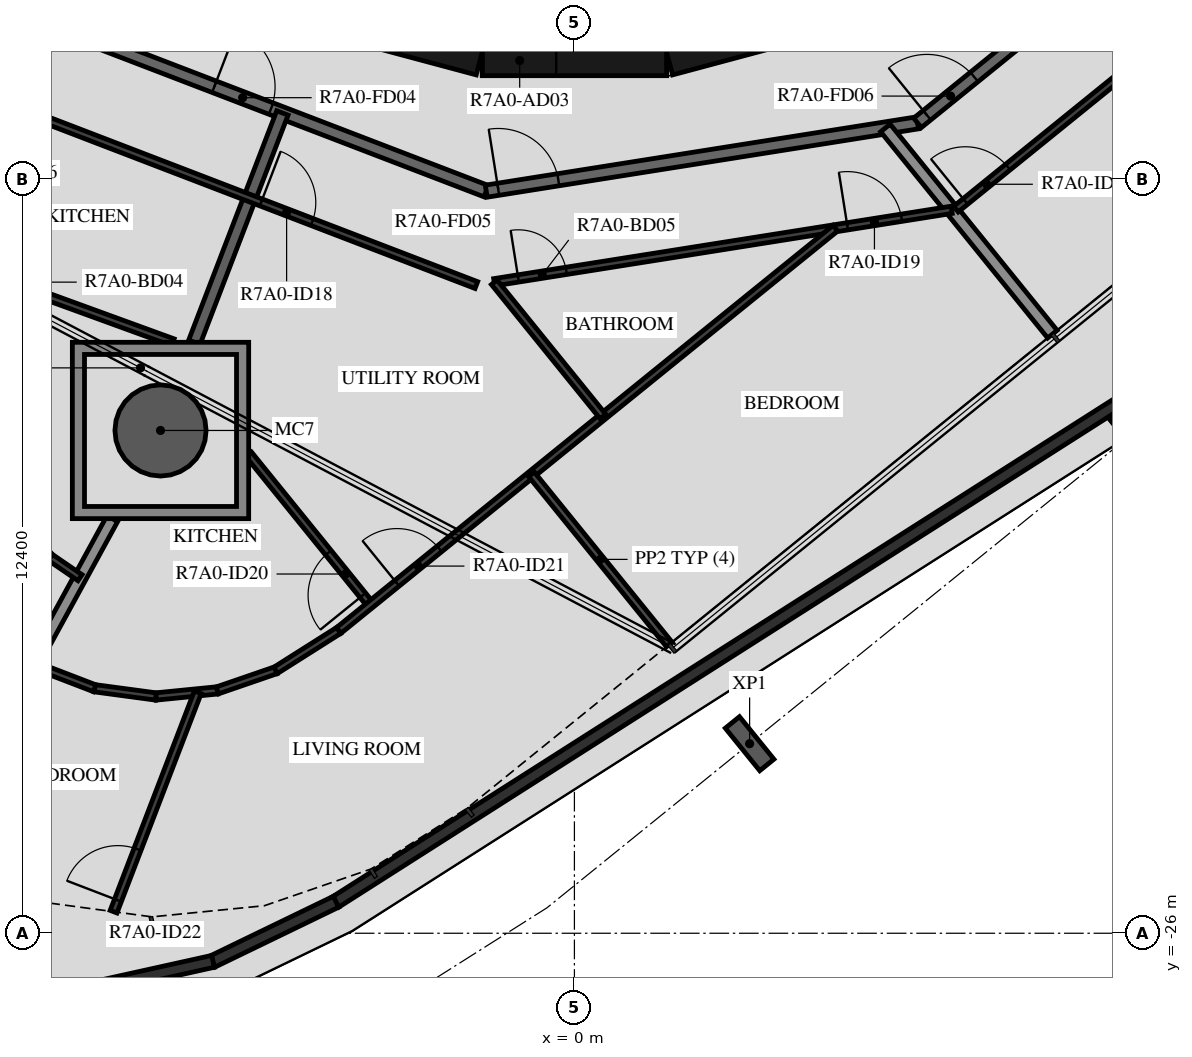
"""IFC4 building model, lengths in metres.
Left out: names, types, materials, properties, quantities, classifications, styles, units other than length and angle.
Written with IfcOpenShell. Run it as: python <this file> out.ifc"""

import sys

from ifc_helpers import new_model, si_unit, direction, frame, frame_2d, origin, origin_2d, place, context, subcontext, project, spatial, polyline, rectangle, hollow_circle, i_section, outline, extrude, element, fill, save


model = new_model("IFC4")
c1 = context("Model", 3, precision=1e-05, world=origin(), true_north=direction((0.0, 1.0)))
c2 = subcontext(c1, "Body", "Model", "MODEL_VIEW")
j1 = project(units=[si_unit("LENGTHUNIT", "METRE"), si_unit("PLANEANGLEUNIT", "RADIAN")], contexts=[c1])
p1 = place(None, origin())
s1 = spatial("IfcSite", under=j1, at=p1, CompositionType="ELEMENT")
p2 = place(p1, origin())
s2 = spatial("IfcBuilding", under=s1, at=p2, CompositionType="ELEMENT")
p3 = place(p2, frame((0.0, 0.0, 263.4)))
s3 = spatial("IfcBuildingStorey", under=s2, at=p3, CompositionType="ELEMENT", Elevation=263.4)
p4 = place(p3, frame((-6.807, -17.732, -0.45), z_axis=(0.0, 0.0, 1.0), x_axis=(1.0, 0.0, 0.0)))
e1 = element("IfcColumn", 1, at=p4, inside=s3, PredefinedType="COLUMN", context=c2, shape_type="SweptSolid", body=[
    extrude(hollow_circle(Radius=0.75, WallThickness=0.035, at=origin_2d()), origin(), (0.0, 0.0, 1.0), 3.57),
])
for number, where, z_axis, x_axis in (
    (2, (2.881, -22.883, -0.45), (0.0, 0.0, 1.0), (-0.777, -0.629, 0.0)),
    (3, (9.182, -17.781, -0.45), (0.0, 0.0, 1.0), (-0.777, -0.629, 0.0)),
):
    element("IfcColumn", number, at=place(p3, frame(where, z_axis=z_axis, x_axis=x_axis)), inside=s3, PredefinedType="COLUMN", context=c2, shape_type="SweptSolid", body=[
        extrude(i_section(OverallWidth=0.3, OverallDepth=0.9, WebThickness=0.019, FlangeThickness=0.035, FilletRadius=0.03, at=origin_2d()), origin(), (0.0, 0.0, 1.0), 3.57),
    ])
p5 = place(p3, frame((24.757, -7.212, 0.03), z_axis=(0.0, 0.0, 1.0), x_axis=(-0.843392095095, -0.537298589177, 0.0)))
e4 = element("IfcWall", 4, at=p5, inside=s3, PredefinedType="PARAPET", context=c2, shape_type="SweptSolid", body=[
    extrude(rectangle(XDim=34.009, YDim=0.2, at=frame_2d((17.004, 0.0))), origin(), (0.0, 0.0, 1.0), 1.5),
])
p6 = place(p3, frame((-3.921, -25.482, 0.03), z_axis=(0.0, 0.0, 1.0), x_axis=(-0.900085379351, -0.435713564028, 0.0)))
e5 = element("IfcWall", 5, at=p6, inside=s3, PredefinedType="PARAPET", context=c2, shape_type="SweptSolid", body=[
    extrude(rectangle(XDim=2.258, YDim=0.2, at=frame_2d((1.129, 0.0))), origin(), (0.0, 0.0, 1.0), 1.5),
])
p7 = place(p3, frame((-5.942, -26.462, 0.03), z_axis=(0.0, 0.0, 1.0), x_axis=(-0.976302939935, -0.21640833966, 0.0)))
e6 = element("IfcWall", 6, at=p7, inside=s3, PredefinedType="PARAPET", context=c2, shape_type="SweptSolid", body=[
    extrude(rectangle(XDim=2.228, YDim=0.2, at=frame_2d((1.114, 0.0))), origin(), (0.0, 0.0, 1.0), 1.5),
])
for number, where, z_axis, x_axis in (
    (7, (1.55, -11.643, 0.0), (0.0, 0.0, 1.0), (0.966, 0.259, 0.0)),
    (8, (-4.479, -10.858, 0.0), (0.0, 0.0, 1.0), (0.966, -0.259, 0.0)),
):
    element("IfcWall", number, at=place(p3, frame(where, z_axis=z_axis, x_axis=x_axis)), inside=s3, PredefinedType="SHEAR", context=c2, shape_type="SweptSolid", body=[
        extrude(rectangle(XDim=3.033, YDim=0.5, at=frame_2d((1.516, 0.0))), origin(), (0.0, 0.0, 1.0), 3.12),
    ])
p8 = place(p3, frame((-1.516, -11.647, 0.0), z_axis=(0.0, 0.0, 1.0), x_axis=(1.0, 0.0, 0.0)))
e9 = element("IfcWall", 9, at=p8, inside=s3, PredefinedType="SHEAR", context=c2, shape_type="SweptSolid", body=[
    extrude(rectangle(XDim=3.033, YDim=0.5, at=frame_2d((1.516, 0.0))), origin(), (0.0, 0.0, 1.0), 3.12),
])
p9 = place(p8, frame((0.016, 0.0, 0.0)))
e10 = element("IfcOpeningElement", 10, at=p9, cuts=e9, PredefinedType="OPENING", context=c2, shape_type="SweptSolid", body=[
    extrude(rectangle(XDim=1.2, YDim=2.1, at=frame_2d((0.6, 1.05))), frame((0.0, 0.26, 0.0), z_axis=(0.0, -1.0, 0.0), x_axis=(1.0, 0.0, 0.0)), (0.0, 0.0, 1.0), 0.52),
])
p10 = place(p3, frame((-8.154, -11.223, 0.0), z_axis=(0.0, 0.0, 1.0), x_axis=(0.93359073609, -0.358341090983, 0.0)))
e11 = element("IfcWall", 11, at=p10, inside=s3, PredefinedType="STANDARD", context=c2, shape_type="SweptSolid", body=[
    extrude(rectangle(XDim=7.181, YDim=0.2, at=frame_2d((3.59, 0.0))), origin(), (0.0, 0.0, 1.0), 3.12),
])
p11 = place(p10, frame((2.39, 0.0, 0.0)))
e12 = element("IfcOpeningElement", 12, at=p11, cuts=e11, PredefinedType="OPENING", context=c2, shape_type="SweptSolid", body=[
    extrude(rectangle(XDim=1.0, YDim=2.1, at=frame_2d((0.5, 1.05))), frame((0.0, 0.11, 0.0), z_axis=(0.0, -1.0, 0.0), x_axis=(1.0, 0.0, 0.0)), (0.0, 0.0, 1.0), 0.22),
])
p12 = place(p3, frame((-1.45, -13.797, 0.0), z_axis=(0.0, 0.0, 1.0), x_axis=(0.987690361611, 0.156421704315, 0.0)))
e13 = element("IfcWall", 13, at=p12, inside=s3, PredefinedType="STANDARD", context=c2, shape_type="SweptSolid", body=[
    extrude(rectangle(XDim=7.181, YDim=0.2, at=frame_2d((3.591, 0.0))), origin(), (0.0, 0.0, 1.0), 3.12),
])
p13 = place(p12, frame((0.2, 0.0, 0.0)))
e14 = element("IfcOpeningElement", 14, at=p13, cuts=e13, PredefinedType="OPENING", context=c2, shape_type="SweptSolid", body=[
    extrude(rectangle(XDim=1.0, YDim=2.1, at=frame_2d((0.5, 1.05))), frame((0.0, 0.11, 0.0), z_axis=(0.0, -1.0, 0.0), x_axis=(1.0, 0.0, 0.0)), (0.0, 0.0, 1.0), 0.22),
])
p14 = place(p3, frame((5.643, -12.673, 0.0), z_axis=(0.0, 0.0, 1.0), x_axis=(0.777160148113, 0.629302871585, 0.0)))
e15 = element("IfcWall", 15, at=p14, inside=s3, PredefinedType="STANDARD", context=c2, shape_type="SweptSolid", body=[
    extrude(rectangle(XDim=7.181, YDim=0.2, at=frame_2d((3.59, 0.0))), origin(), (0.0, 0.0, 1.0), 3.12),
])
p15 = place(p14, frame((0.2, 0.0, 0.0)))
e16 = element("IfcOpeningElement", 16, at=p15, cuts=e15, PredefinedType="OPENING", context=c2, shape_type="SweptSolid", body=[
    extrude(rectangle(XDim=1.0, YDim=2.1, at=frame_2d((0.5, 1.05))), frame((0.0, 0.11, 0.0), z_axis=(0.0, -1.0, 0.0), x_axis=(1.0, 0.0, 0.0)), (0.0, 0.0, 1.0), 0.22),
])
p16 = place(p3, frame((-6.25, -16.282, 0.0), z_axis=(0.0, 0.0, 1.0), x_axis=(0.358351333512, 0.933586804625, 0.0)))
e17 = element("IfcWall", 17, at=p16, inside=s3, PredefinedType="STANDARD", context=c2, shape_type="SweptSolid", body=[
    extrude(rectangle(XDim=4.04, YDim=0.2, at=frame_2d((2.02, 0.0))), origin(), (0.0, 0.0, 1.0), 3.12),
])
p17 = place(p3, frame((-10.637, -24.738, 0.0), z_axis=(0.0, 0.0, 1.0), x_axis=(0.479683887596, 0.877441375808, 0.0)))
e18 = element("IfcWall", 18, at=p17, inside=s3, PredefinedType="STANDARD", context=c2, shape_type="SweptSolid", body=[
    extrude(rectangle(XDim=6.333, YDim=0.2, at=frame_2d((3.166, 0.0))), origin(), (0.0, 0.0, 1.0), 2.73),
])
p18 = place(p3, frame((7.861, -16.148, 0.0), z_axis=(0.0, 0.0, 1.0), x_axis=(-0.629330189513, 0.777138026716, 0.0)))
e19 = element("IfcWall", 19, at=p18, inside=s3, PredefinedType="STANDARD", context=c2, shape_type="SweptSolid", body=[
    extrude(rectangle(XDim=4.364, YDim=0.2, at=frame_2d((2.182, 0.0))), origin(), (0.0, 0.0, 1.0), 2.73),
])
p19 = place(p3, frame((-9.067, -12.479, 0.0), z_axis=(0.0, 0.0, 1.0), x_axis=(0.933579449035, -0.358370495911, 0.0)))
e20 = element("IfcWall", 20, at=p19, inside=s3, PredefinedType="PARTITIONING", context=c2, shape_type="SweptSolid", body=[
    extrude(rectangle(XDim=7.985, YDim=0.12, at=frame_2d((3.992, 0.0))), origin(), (0.0, 0.0, 1.0), 3.12),
])
p20 = place(p19, frame((4.192, 0.0, 0.0)))
e21 = element("IfcOpeningElement", 21, at=p20, cuts=e20, PredefinedType="OPENING", context=c2, shape_type="SweptSolid", body=[
    extrude(rectangle(XDim=0.9, YDim=2.1, at=frame_2d((0.45, 1.05))), frame((0.0, 0.07, 0.0), z_axis=(0.0, -1.0, 0.0), x_axis=(1.0, 0.0, 0.0)), (0.0, 0.0, 1.0), 0.14),
])
p21 = place(p3, frame((-10.071, -15.019, 0.0), z_axis=(0.0, 0.0, 1.0), x_axis=(0.939648507355, -0.34214131967, 0.0)))
e22 = element("IfcWall", 22, at=p21, inside=s3, PredefinedType="PARTITIONING", context=c2, shape_type="SweptSolid", body=[
    extrude(rectangle(XDim=3.691, YDim=0.12, at=frame_2d((1.846, 0.0))), origin(), (0.0, 0.0, 1.0), 3.12),
])
p22 = place(p21, frame((0.4, 0.0, 0.0)))
e23 = element("IfcOpeningElement", 23, at=p22, cuts=e22, PredefinedType="OPENING", context=c2, shape_type="SweptSolid", body=[
    extrude(rectangle(XDim=0.8, YDim=2.1, at=frame_2d((0.4, 1.05))), frame((0.0, 0.07, 0.0), z_axis=(0.0, -1.0, 0.0), x_axis=(1.0, 0.0, 0.0)), (0.0, 0.0, 1.0), 0.14),
])
p23 = place(p3, frame((-8.13, -20.153, 0.0), z_axis=(0.0, 0.0, 1.0), x_axis=(-0.825599905246, 0.564255967145, 0.0)))
e24 = element("IfcWall", 24, at=p23, inside=s3, PredefinedType="PARTITIONING", context=c2, shape_type="SweptSolid", body=[
    extrude(rectangle(XDim=0.593, YDim=0.12, at=frame_2d((0.297, 0.0))), origin(), (0.0, 0.0, 1.0), 3.12),
])
p24 = place(p3, frame((-8.62, -19.818, 0.0), z_axis=(0.0, 0.0, 1.0), x_axis=(-0.673448438961, 0.739234198385, 0.0)))
e25 = element("IfcWall", 25, at=p24, inside=s3, PredefinedType="PARTITIONING", context=c2, shape_type="SweptSolid", body=[
    extrude(rectangle(XDim=0.642, YDim=0.12, at=frame_2d((0.321, 0.0))), origin(), (0.0, 0.0, 1.0), 3.12),
])
p25 = place(p3, frame((-1.318, -15.294, 0.0), z_axis=(0.0, 0.0, 1.0), x_axis=(0.987689040792, 0.156430044108, 0.0)))
e26 = element("IfcWall", 26, at=p25, inside=s3, PredefinedType="PARTITIONING", context=c2, shape_type="SweptSolid", body=[
    extrude(rectangle(XDim=7.616, YDim=0.12, at=frame_2d((3.808, 0.0))), origin(), (0.0, 0.0, 1.0), 3.12),
])
p26 = place(p25, frame((0.4, 0.0, 0.0)))
e27 = element("IfcOpeningElement", 27, at=p26, cuts=e26, PredefinedType="OPENING", context=c2, shape_type="SweptSolid", body=[
    extrude(rectangle(XDim=0.8, YDim=2.1, at=frame_2d((0.4, 1.05))), frame((0.0, 0.07, 0.0), z_axis=(0.0, -1.0, 0.0), x_axis=(1.0, 0.0, 0.0)), (0.0, 0.0, 1.0), 0.14),
])
p27 = place(p25, frame((5.88, 0.0, 0.0)))
e28 = element("IfcOpeningElement", 28, at=p27, cuts=e26, PredefinedType="OPENING", context=c2, shape_type="SweptSolid", body=[
    extrude(rectangle(XDim=0.9, YDim=2.1, at=frame_2d((0.45, 1.05))), frame((0.0, 0.07, 0.0), z_axis=(0.0, -1.0, 0.0), x_axis=(1.0, 0.0, 0.0)), (0.0, 0.0, 1.0), 0.14),
])
p28 = place(p3, frame((-5.872, -22.006, 0.0), z_axis=(0.0, 0.0, 1.0), x_axis=(-0.99510832942, -0.09878973995, 0.0)))
e29 = element("IfcWall", 29, at=p28, inside=s3, PredefinedType="PARTITIONING", context=c2, shape_type="SweptSolid", body=[
    extrude(rectangle(XDim=1.016, YDim=0.12, at=frame_2d((0.508, 0.0))), origin(), (0.0, 0.0, 1.0), 3.12),
])
p29 = place(p3, frame((-6.883, -22.106, 0.0), z_axis=(0.0, 0.0, 1.0), x_axis=(-0.991069822827, 0.133343939799, 0.0)))
e30 = element("IfcWall", 30, at=p29, inside=s3, PredefinedType="PARTITIONING", context=c2, shape_type="SweptSolid", body=[
    extrude(rectangle(XDim=1.016, YDim=0.12, at=frame_2d((0.508, 0.0))), origin(), (0.0, 0.0, 1.0), 3.12),
])
p30 = place(p3, frame((-7.89, -21.971, 0.0), z_axis=(0.0, 0.0, 1.0), x_axis=(-0.933574629243, 0.358383051545, 0.0)))
e31 = element("IfcWall", 31, at=p30, inside=s3, PredefinedType="PARTITIONING", context=c2, shape_type="SweptSolid", body=[
    extrude(rectangle(XDim=1.016, YDim=0.12, at=frame_2d((0.508, 0.0))), origin(), (0.0, 0.0, 1.0), 3.12),
])
p31 = place(p3, frame((-7.579, -25.646, 0.0), z_axis=(0.0, 0.0, 1.0), x_axis=(0.358314257596, 0.933601035134, 0.0)))
e32 = element("IfcWall", 32, at=p31, inside=s3, PredefinedType="PARTITIONING", context=c2, shape_type="SweptSolid", body=[
    extrude(rectangle(XDim=3.864, YDim=0.12, at=frame_2d((1.932, 0.0))), origin(), (0.0, 0.0, 1.0), 3.12),
])
p32 = place(p31, frame((0.2, 0.0, 0.0)))
e33 = element("IfcOpeningElement", 33, at=p32, cuts=e32, PredefinedType="OPENING", context=c2, shape_type="SweptSolid", body=[
    extrude(rectangle(XDim=0.9, YDim=2.1, at=frame_2d((0.45, 1.05))), frame((0.0, 0.07, 0.0), z_axis=(0.0, -1.0, 0.0), x_axis=(1.0, 0.0, 0.0)), (0.0, 0.0, 1.0), 0.14),
])
p33 = place(p3, frame((-3.354, -20.597, 0.0), z_axis=(0.0, 0.0, 1.0), x_axis=(-0.629352711751, 0.777119787556, 0.0)))
e34 = element("IfcWall", 34, at=p33, inside=s3, PredefinedType="PARTITIONING", context=c2, shape_type="SweptSolid", body=[
    extrude(rectangle(XDim=3.182, YDim=0.12, at=frame_2d((1.591, 0.0))), origin(), (0.0, 0.0, 1.0), 3.12),
])
p34 = place(p33, frame((0.2, 0.0, 0.0)))
e35 = element("IfcOpeningElement", 35, at=p34, cuts=e34, PredefinedType="OPENING", context=c2, shape_type="SweptSolid", body=[
    extrude(rectangle(XDim=0.9, YDim=2.1, at=frame_2d((0.45, 1.05))), frame((0.0, 0.07, 0.0), z_axis=(0.0, -1.0, 0.0), x_axis=(1.0, 0.0, 0.0)), (0.0, 0.0, 1.0), 0.14),
])
p35 = place(p3, frame((-5.872, -22.006, 0.0), z_axis=(0.0, 0.0, 1.0), x_axis=(0.945561838326, 0.325442483247, 0.0)))
e36 = element("IfcWall", 36, at=p35, inside=s3, PredefinedType="PARTITIONING", context=c2, shape_type="SweptSolid", body=[
    extrude(rectangle(XDim=1.016, YDim=0.12, at=frame_2d((0.508, 0.0))), origin(), (0.0, 0.0, 1.0), 3.12),
])
p36 = place(p3, frame((-4.912, -21.676, 0.0), z_axis=(0.0, 0.0, 1.0), x_axis=(0.84494492492, 0.534853319941, 0.0)))
e37 = element("IfcWall", 37, at=p36, inside=s3, PredefinedType="PARTITIONING", context=c2, shape_type="SweptSolid", body=[
    extrude(rectangle(XDim=1.228, YDim=0.12, at=frame_2d((0.614, 0.0))), origin(), (0.0, 0.0, 1.0), 3.12),
])
p37 = place(p3, frame((-3.875, -21.019, 0.0), z_axis=(0.0, 0.0, 1.0), x_axis=(0.777149096542, 0.629316519523, 0.0)))
e38 = element("IfcWall", 38, at=p37, inside=s3, PredefinedType="PARTITIONING", context=c2, shape_type="SweptSolid", body=[
    extrude(rectangle(XDim=10.508, YDim=0.12, at=frame_2d((5.254, 0.0))), origin(), (0.0, 0.0, 1.0), 3.12),
])
p38 = place(p37, frame((1.23, 0.0, 0.0)))
e39 = element("IfcOpeningElement", 39, at=p38, cuts=e38, PredefinedType="OPENING", context=c2, shape_type="SweptSolid", body=[
    extrude(rectangle(XDim=0.9, YDim=2.1, at=frame_2d((0.45, 1.05))), frame((0.0, 0.07, 0.0), z_axis=(0.0, -1.0, 0.0), x_axis=(1.0, 0.0, 0.0)), (0.0, 0.0, 1.0), 0.14),
])
p39 = place(p3, frame((0.469, -17.502, 0.0), z_axis=(0.0, 0.0, 1.0), x_axis=(-0.629307025607, 0.777156784389, 0.0)))
e40 = element("IfcWall", 40, at=p39, inside=s3, PredefinedType="PARTITIONING", context=c2, shape_type="SweptSolid", body=[
    extrude(rectangle(XDim=2.84, YDim=0.12, at=frame_2d((1.42, 0.0))), origin(), (0.0, 0.0, 1.0), 3.12),
])
p40 = place(p3, frame((1.56, -21.251, 0.0), z_axis=(0.0, 0.0, 1.0), x_axis=(-0.62934843781, 0.7771232488, 0.0)))
e41 = element("IfcWall", 41, at=p40, inside=s3, PredefinedType="PARTITIONING", context=c2, shape_type="SweptSolid", body=[
    extrude(rectangle(XDim=3.6, YDim=0.12, at=frame_2d((1.8, 0.0))), origin(), (0.0, 0.0, 1.0), 2.73),
])
p41 = place(p3, frame((6.274, -14.092, 0.0), z_axis=(0.0, 0.0, 1.0), x_axis=(0.777135206268, 0.62933367237, 0.0)))
e42 = element("IfcWall", 42, at=p41, inside=s3, PredefinedType="PARTITIONING", context=c2, shape_type="SweptSolid", body=[
    extrude(rectangle(XDim=7.985, YDim=0.12, at=frame_2d((3.992, 0.0))), origin(), (0.0, 0.0, 1.0), 3.12),
])
p42 = place(p41, frame((0.2, 0.0, 0.0)))
e43 = element("IfcOpeningElement", 43, at=p42, cuts=e42, PredefinedType="OPENING", context=c2, shape_type="SweptSolid", body=[
    extrude(rectangle(XDim=0.9, YDim=2.1, at=frame_2d((0.45, 1.05))), frame((0.0, 0.07, 0.0), z_axis=(0.0, -1.0, 0.0), x_axis=(1.0, 0.0, 0.0)), (0.0, 0.0, 1.0), 0.14),
])
p43 = place(p3, origin())
e44 = element("IfcWall", 44, at=p43, inside=s3, PredefinedType="STANDARD", context=c2, shape_type="SweptSolid", body=[
    extrude(outline(polyline([(-5.357, -16.282), (-5.357, -19.182), (-8.257, -19.182), (-8.257, -16.282), (-5.357, -16.282)]), holes=[polyline([(-8.057, -18.982), (-5.557, -18.982), (-5.557, -16.482), (-8.057, -16.482), (-8.057, -18.982)])]), origin(), (0.0, 0.0, 1.0), 3.12),
])
p44 = place(p9, origin())
e45 = element("IfcDoor", 45, at=p44, inside=s3, OperationType="SINGLE_SWING_RIGHT", PredefinedType="DOOR", context=c2, shape_type="SweptSolid", body=[
    extrude(rectangle(XDim=1.2, YDim=2.1, at=frame_2d((0.6, 1.05))), frame((0.0, 0.025, 0.0), z_axis=(0.0, -1.0, 0.0), x_axis=(1.0, 0.0, 0.0)), (0.0, 0.0, 1.0), 0.05),
])
fill(e10, e45)
p45 = place(p11, origin())
e46 = element("IfcDoor", 46, at=p45, inside=s3, OperationType="SINGLE_SWING_RIGHT", PredefinedType="DOOR", context=c2, shape_type="SweptSolid", body=[
    extrude(rectangle(XDim=1.0, YDim=2.1, at=frame_2d((0.5, 1.05))), frame((0.0, 0.025, 0.0), z_axis=(0.0, -1.0, 0.0), x_axis=(1.0, 0.0, 0.0)), (0.0, 0.0, 1.0), 0.05),
])
fill(e12, e46)
p46 = place(p13, origin())
e47 = element("IfcDoor", 47, at=p46, inside=s3, OperationType="SINGLE_SWING_LEFT", PredefinedType="DOOR", context=c2, shape_type="SweptSolid", body=[
    extrude(rectangle(XDim=1.0, YDim=2.1, at=frame_2d((0.5, 1.05))), frame((0.0, 0.025, 0.0), z_axis=(0.0, -1.0, 0.0), x_axis=(1.0, 0.0, 0.0)), (0.0, 0.0, 1.0), 0.05),
])
fill(e14, e47)
p47 = place(p20, origin())
e48 = element("IfcDoor", 48, at=p47, inside=s3, OperationType="SINGLE_SWING_RIGHT", PredefinedType="DOOR", context=c2, shape_type="SweptSolid", body=[
    extrude(rectangle(XDim=0.9, YDim=2.1, at=frame_2d((0.45, 1.05))), frame((0.0, 0.025, 0.0), z_axis=(0.0, -1.0, 0.0), x_axis=(1.0, 0.0, 0.0)), (0.0, 0.0, 1.0), 0.05),
])
fill(e21, e48)
p48 = place(p26, origin())
e49 = element("IfcDoor", 49, at=p48, inside=s3, OperationType="SINGLE_SWING_LEFT", PredefinedType="DOOR", context=c2, shape_type="SweptSolid", body=[
    extrude(rectangle(XDim=0.8, YDim=2.1, at=frame_2d((0.4, 1.05))), frame((0.0, 0.025, 0.0), z_axis=(0.0, -1.0, 0.0), x_axis=(1.0, 0.0, 0.0)), (0.0, 0.0, 1.0), 0.05),
])
fill(e27, e49)
p49 = place(p27, origin())
e50 = element("IfcDoor", 50, at=p49, inside=s3, OperationType="SINGLE_SWING_LEFT", PredefinedType="DOOR", context=c2, shape_type="SweptSolid", body=[
    extrude(rectangle(XDim=0.9, YDim=2.1, at=frame_2d((0.45, 1.05))), frame((0.0, 0.025, 0.0), z_axis=(0.0, -1.0, 0.0), x_axis=(1.0, 0.0, 0.0)), (0.0, 0.0, 1.0), 0.05),
])
fill(e28, e50)
p50 = place(p34, origin())
e51 = element("IfcDoor", 51, at=p50, inside=s3, OperationType="SINGLE_SWING_LEFT", PredefinedType="DOOR", context=c2, shape_type="SweptSolid", body=[
    extrude(rectangle(XDim=0.9, YDim=2.1, at=frame_2d((0.45, 1.05))), frame((0.0, 0.025, 0.0), z_axis=(0.0, -1.0, 0.0), x_axis=(1.0, 0.0, 0.0)), (0.0, 0.0, 1.0), 0.05),
])
fill(e35, e51)
p51 = place(p38, origin())
e52 = element("IfcDoor", 52, at=p51, inside=s3, OperationType="SINGLE_SWING_LEFT", PredefinedType="DOOR", context=c2, shape_type="SweptSolid", body=[
    extrude(rectangle(XDim=0.9, YDim=2.1, at=frame_2d((0.45, 1.05))), frame((0.0, 0.025, 0.0), z_axis=(0.0, -1.0, 0.0), x_axis=(1.0, 0.0, 0.0)), (0.0, 0.0, 1.0), 0.05),
])
fill(e39, e52)
p52 = place(p32, origin())
e53 = element("IfcDoor", 53, at=p52, inside=s3, OperationType="SINGLE_SWING_LEFT", PredefinedType="DOOR", context=c2, shape_type="SweptSolid", body=[
    extrude(rectangle(XDim=0.9, YDim=2.1, at=frame_2d((0.45, 1.05))), frame((0.0, 0.025, 0.0), z_axis=(0.0, -1.0, 0.0), x_axis=(1.0, 0.0, 0.0)), (0.0, 0.0, 1.0), 0.05),
])
fill(e33, e53)
p53 = place(p15, origin())
e54 = element("IfcDoor", 54, at=p53, inside=s3, OperationType="SINGLE_SWING_LEFT", PredefinedType="DOOR", context=c2, shape_type="SweptSolid", body=[
    extrude(rectangle(XDim=1.0, YDim=2.1, at=frame_2d((0.5, 1.05))), frame((0.0, 0.025, 0.0), z_axis=(0.0, -1.0, 0.0), x_axis=(1.0, 0.0, 0.0)), (0.0, 0.0, 1.0), 0.05),
])
fill(e16, e54)
p54 = place(p42, origin())
e55 = element("IfcDoor", 55, at=p54, inside=s3, OperationType="SINGLE_SWING_LEFT", PredefinedType="DOOR", context=c2, shape_type="SweptSolid", body=[
    extrude(rectangle(XDim=0.9, YDim=2.1, at=frame_2d((0.45, 1.05))), frame((0.0, 0.025, 0.0), z_axis=(0.0, -1.0, 0.0), x_axis=(1.0, 0.0, 0.0)), (0.0, 0.0, 1.0), 0.05),
])
fill(e43, e55)
save(model, sys.argv[1])
